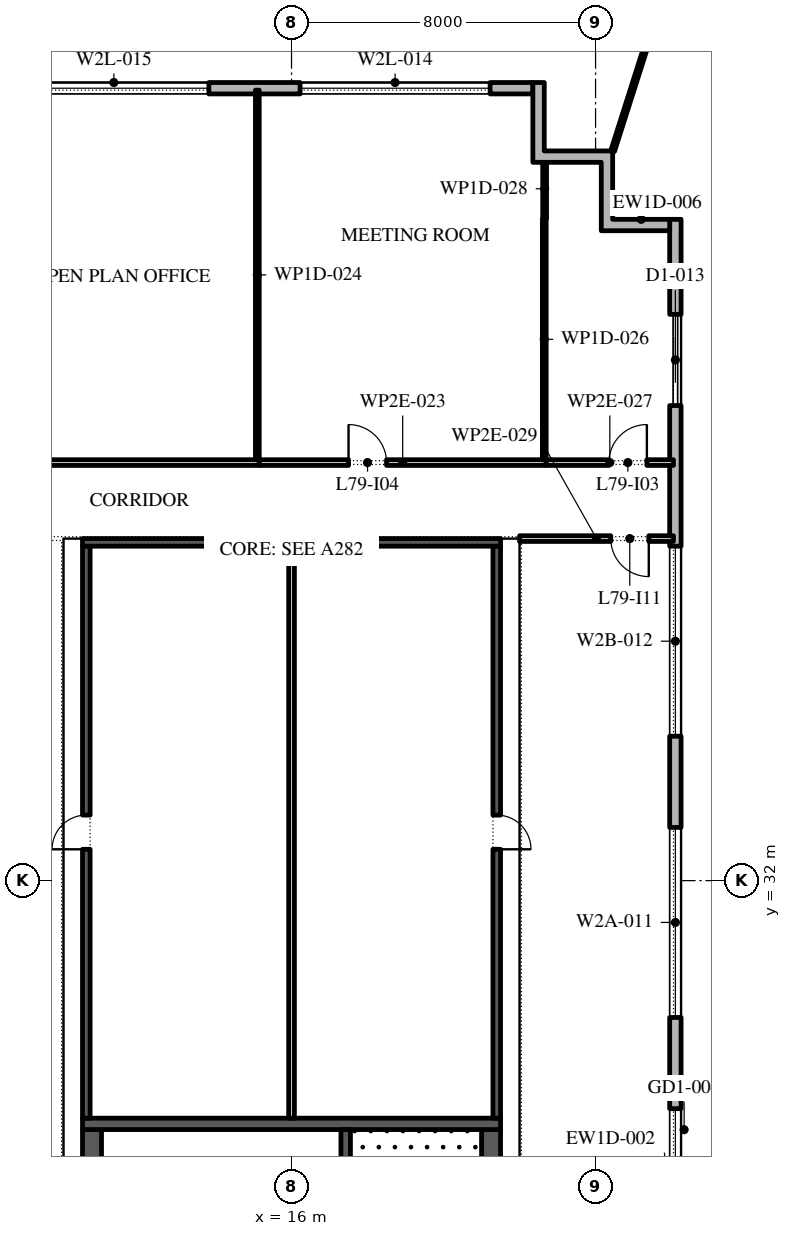
"""IFC4 building model, lengths in metres.
Left out: names, types, materials, properties, quantities, classifications, styles, units other than length and angle.
Written with IfcOpenShell. Run it as: python <this file> out.ifc"""

import sys

from ifc_helpers import new_model, si_unit, direction, frame, frame_2d, origin, place, context, subcontext, project, spatial, polyline, rectangle, outline, extrude, element, fill, save


model = new_model("IFC4")
c1 = context("Model", 3, precision=1e-05, world=origin(), true_north=direction((0.0, 1.0)))
c2 = subcontext(c1, "Body", "Model", "MODEL_VIEW")
j1 = project(units=[si_unit("LENGTHUNIT", "METRE"), si_unit("PLANEANGLEUNIT", "RADIAN")], contexts=[c1])
p1 = place(None, origin())
s1 = spatial("IfcSite", under=j1, at=p1, CompositionType="ELEMENT")
p2 = place(p1, origin())
s2 = spatial("IfcBuilding", under=s1, at=p2, CompositionType="ELEMENT")
p3 = place(p2, frame((0.0, 0.0, 359.4)))
s3 = spatial("IfcBuildingStorey", under=s2, at=p3, CompositionType="ELEMENT", Elevation=359.4)
p4 = place(p3, frame((26.1, -2.1, 0.0), z_axis=(0.0, 0.0, 1.0), x_axis=(0.0, 1.0, 0.0)))
e1 = element("IfcWall", 1, at=p4, inside=s3, PredefinedType="STANDARD", context=c2, shape_type="SweptSolid", body=[
    extrude(rectangle(XDim=51.5, YDim=0.3, at=frame_2d((25.75, 0.0))), origin(), (0.0, 0.0, 1.0), 3.9),
])
p5 = place(p4, frame((1.05, 0.0, 0.45)))
e2 = element("IfcOpeningElement", 2, at=p5, cuts=e1, PredefinedType="OPENING", context=c2, shape_type="SweptSolid", body=[
    extrude(rectangle(XDim=5.0, YDim=2.95, at=frame_2d((2.5, 1.475))), frame((0.0, 0.16, 0.0), z_axis=(0.0, -1.0, 0.0), x_axis=(1.0, 0.0, 0.0)), (0.0, 0.0, 1.0), 0.32),
])
p6 = place(p4, frame((8.3, 0.0, 0.45)))
e3 = element("IfcOpeningElement", 3, at=p6, cuts=e1, PredefinedType="OPENING", context=c2, shape_type="SweptSolid", body=[
    extrude(rectangle(XDim=5.0, YDim=2.95, at=frame_2d((2.5, 1.475))), frame((0.0, 0.16, 0.0), z_axis=(0.0, -1.0, 0.0), x_axis=(1.0, 0.0, 0.0)), (0.0, 0.0, 1.0), 0.32),
])
p7 = place(p4, frame((17.0, 0.0, 0.0)))
e4 = element("IfcOpeningElement", 4, at=p7, cuts=e1, PredefinedType="OPENING", context=c2, shape_type="SweptSolid", body=[
    extrude(rectangle(XDim=2.4, YDim=3.5, at=frame_2d((1.2, 1.75))), frame((0.0, 0.16, 0.0), z_axis=(0.0, -1.0, 0.0), x_axis=(1.0, 0.0, 0.0)), (0.0, 0.0, 1.0), 0.32),
])
p8 = place(p4, frame((23.1, 0.0, 0.45)))
e5 = element("IfcOpeningElement", 5, at=p8, cuts=e1, PredefinedType="OPENING", context=c2, shape_type="SweptSolid", body=[
    extrude(rectangle(XDim=5.0, YDim=2.95, at=frame_2d((2.5, 1.475))), frame((0.0, 0.16, 0.0), z_axis=(0.0, -1.0, 0.0), x_axis=(1.0, 0.0, 0.0)), (0.0, 0.0, 1.0), 0.32),
])
p9 = place(p4, frame((30.5, 0.0, 0.45)))
e6 = element("IfcOpeningElement", 6, at=p9, cuts=e1, PredefinedType="OPENING", context=c2, shape_type="SweptSolid", body=[
    extrude(rectangle(XDim=5.0, YDim=2.95, at=frame_2d((2.5, 1.475))), frame((0.0, 0.16, 0.0), z_axis=(0.0, -1.0, 0.0), x_axis=(1.0, 0.0, 0.0)), (0.0, 0.0, 1.0), 0.32),
])
p10 = place(p4, frame((37.9, 0.0, 0.45)))
e7 = element("IfcOpeningElement", 7, at=p10, cuts=e1, PredefinedType="OPENING", context=c2, shape_type="SweptSolid", body=[
    extrude(rectangle(XDim=5.0, YDim=2.9, at=frame_2d((2.5, 1.45))), frame((0.0, 0.16, 0.0), z_axis=(0.0, -1.0, 0.0), x_axis=(1.0, 0.0, 0.0)), (0.0, 0.0, 1.0), 0.32),
])
p11 = place(p4, frame((46.6, 0.0, 0.0)))
e8 = element("IfcOpeningElement", 8, at=p11, cuts=e1, PredefinedType="OPENING", context=c2, shape_type="SweptSolid", body=[
    extrude(rectangle(XDim=2.4, YDim=3.5, at=frame_2d((1.2, 1.75))), frame((0.0, 0.16, 0.0), z_axis=(0.0, -1.0, 0.0), x_axis=(1.0, 0.0, 0.0)), (0.0, 0.0, 1.0), 0.32),
])
p12 = place(p3, frame((22.35, 52.85, 0.0), z_axis=(0.0, 0.0, 1.0), x_axis=(-1.0, 0.0, 0.0)))
e9 = element("IfcWall", 9, at=p12, inside=s3, PredefinedType="STANDARD", context=c2, shape_type="SweptSolid", body=[
    extrude(rectangle(XDim=45.0, YDim=0.3, at=frame_2d((22.5, 0.0))), origin(), (0.0, 0.0, 1.0), 3.9),
])
p13 = place(p12, frame((1.125, 0.0, 0.45)))
e10 = element("IfcOpeningElement", 10, at=p13, cuts=e9, PredefinedType="OPENING", context=c2, shape_type="SweptSolid", body=[
    extrude(rectangle(XDim=5.0, YDim=2.4, at=frame_2d((2.5, 1.2))), frame((0.0, 0.16, 0.0), z_axis=(0.0, -1.0, 0.0), x_axis=(1.0, 0.0, 0.0)), (0.0, 0.0, 1.0), 0.32),
])
p14 = place(p12, frame((8.525, 0.0, 0.45)))
e11 = element("IfcOpeningElement", 11, at=p14, cuts=e9, PredefinedType="OPENING", context=c2, shape_type="SweptSolid", body=[
    extrude(rectangle(XDim=5.0, YDim=2.4, at=frame_2d((2.5, 1.2))), frame((0.0, 0.16, 0.0), z_axis=(0.0, -1.0, 0.0), x_axis=(1.0, 0.0, 0.0)), (0.0, 0.0, 1.0), 0.32),
])
p15 = place(p12, frame((17.375, 0.0, 0.0)))
e12 = element("IfcOpeningElement", 12, at=p15, cuts=e9, PredefinedType="OPENING", context=c2, shape_type="SweptSolid", body=[
    extrude(rectangle(XDim=2.4, YDim=3.5, at=frame_2d((1.2, 1.75))), frame((0.0, 0.16, 0.0), z_axis=(0.0, -1.0, 0.0), x_axis=(1.0, 0.0, 0.0)), (0.0, 0.0, 1.0), 0.32),
])
p16 = place(p12, frame((23.625, 0.0, 0.45)))
e13 = element("IfcOpeningElement", 13, at=p16, cuts=e9, PredefinedType="OPENING", context=c2, shape_type="SweptSolid", body=[
    extrude(rectangle(XDim=5.0, YDim=2.4, at=frame_2d((2.5, 1.2))), frame((0.0, 0.16, 0.0), z_axis=(0.0, -1.0, 0.0), x_axis=(1.0, 0.0, 0.0)), (0.0, 0.0, 1.0), 0.32),
])
p17 = place(p12, frame((31.175, 0.0, 0.45)))
e14 = element("IfcOpeningElement", 14, at=p17, cuts=e9, PredefinedType="OPENING", context=c2, shape_type="SweptSolid", body=[
    extrude(rectangle(XDim=5.0, YDim=2.4, at=frame_2d((2.5, 1.2))), frame((0.0, 0.16, 0.0), z_axis=(0.0, -1.0, 0.0), x_axis=(1.0, 0.0, 0.0)), (0.0, 0.0, 1.0), 0.32),
])
p18 = place(p12, frame((38.725, 0.0, 0.45)))
e15 = element("IfcOpeningElement", 15, at=p18, cuts=e9, PredefinedType="OPENING", context=c2, shape_type="SweptSolid", body=[
    extrude(rectangle(XDim=5.0, YDim=2.4, at=frame_2d((2.5, 1.2))), frame((0.0, 0.16, 0.0), z_axis=(0.0, -1.0, 0.0), x_axis=(1.0, 0.0, 0.0)), (0.0, 0.0, 1.0), 0.32),
])
p19 = place(p3, origin())
e16 = element("IfcWall", 16, at=p19, inside=s3, PredefinedType="STANDARD", context=c2, shape_type="SweptSolid", body=[
    extrude(outline(polyline([(24.15, 50.9), (22.35, 50.9), (22.35, 53.0), (22.65, 53.0), (22.65, 51.2), (24.45, 51.2), (24.45, 49.4), (25.95, 49.4), (25.95, 49.1), (24.15, 49.1), (24.15, 50.9)])), origin(), (0.0, 0.0, 1.0), 3.9),
])
p20 = place(p3, frame((24.45, 51.2, -0.05), z_axis=(0.0, 0.0, 1.0), x_axis=(0.303785175512, 0.952740556048, 0.0)))
e17 = element("IfcWall", 17, at=p20, inside=s3, PredefinedType="STANDARD", context=c2, shape_type="SweptSolid", body=[
    extrude(rectangle(XDim=7.174, YDim=0.1, at=frame_2d((3.587, 0.0))), origin(), (0.0, 0.0, 1.0), 3.95),
])
p21 = place(p3, frame((21.25, -2.45, 0.0), z_axis=(0.0, 0.0, 1.0), x_axis=(0.0, 1.0, 0.0)))
e18 = element("IfcWall", 18, at=p21, inside=s3, PredefinedType="SHEAR", context=c2, shape_type="SweptSolid", body=[
    extrude(rectangle(XDim=27.9, YDim=0.5, at=frame_2d((13.95, 0.0))), origin(), (0.0, 0.0, 1.0), 3.9),
])
p22 = place(p21, frame((5.05, 0.0, 0.0)))
e19 = element("IfcOpeningElement", 19, at=p22, cuts=e18, PredefinedType="OPENING", context=c2, shape_type="SweptSolid", body=[
    extrude(rectangle(XDim=1.2, YDim=2.1, at=frame_2d((0.6, 1.05))), frame((0.0, 0.26, 0.0), z_axis=(0.0, -1.0, 0.0), x_axis=(1.0, 0.0, 0.0)), (0.0, 0.0, 1.0), 0.52),
])
p23 = place(p21, frame((21.65, 0.0, 0.0)))
e20 = element("IfcOpeningElement", 20, at=p23, cuts=e18, PredefinedType="OPENING", context=c2, shape_type="SweptSolid", body=[
    extrude(rectangle(XDim=1.2, YDim=2.1, at=frame_2d((0.6, 1.05))), frame((0.0, 0.26, 0.0), z_axis=(0.0, -1.0, 0.0), x_axis=(1.0, 0.0, 0.0)), (0.0, 0.0, 1.0), 0.52),
])
p24 = place(p3, frame((10.75, -2.45, 0.0), z_axis=(0.0, 0.0, 1.0), x_axis=(0.0, 1.0, 0.0)))
e21 = element("IfcWall", 21, at=p24, inside=s3, PredefinedType="SHEAR", context=c2, shape_type="SweptSolid", body=[
    extrude(rectangle(XDim=27.9, YDim=0.5, at=frame_2d((13.95, 0.0))), origin(), (0.0, 0.0, 1.0), 3.9),
])
p25 = place(p24, frame((23.65, 0.0, 0.0)))
e22 = element("IfcOpeningElement", 22, at=p25, cuts=e21, PredefinedType="OPENING", context=c2, shape_type="SweptSolid", body=[
    extrude(rectangle(XDim=2.4, YDim=2.1, at=frame_2d((1.2, 1.05))), frame((0.0, 0.26, 0.0), z_axis=(0.0, -1.0, 0.0), x_axis=(1.0, 0.0, 0.0)), (0.0, 0.0, 1.0), 0.52),
])
p26 = place(p24, frame((1.387, 0.0, 0.0)))
e23 = element("IfcOpeningElement", 23, at=p26, cuts=e21, PredefinedType="OPENING", context=c2, shape_type="SweptSolid", body=[
    extrude(rectangle(XDim=0.9, YDim=2.1, at=frame_2d((0.45, 1.05))), frame((0.0, 0.26, 0.0), z_axis=(0.0, -1.0, 0.0), x_axis=(1.0, 0.0, 0.0)), (0.0, 0.0, 1.0), 0.52),
])
p27 = place(p24, frame((4.562, 0.0, 0.0)))
e24 = element("IfcOpeningElement", 24, at=p27, cuts=e21, PredefinedType="OPENING", context=c2, shape_type="SweptSolid", body=[
    extrude(rectangle(XDim=1.0, YDim=2.1, at=frame_2d((0.5, 1.05))), frame((0.0, 0.26, 0.0), z_axis=(0.0, -1.0, 0.0), x_axis=(1.0, 0.0, 0.0)), (0.0, 0.0, 1.0), 0.52),
])
p28 = place(p3, frame((10.5, 25.6, 0.0), z_axis=(0.0, 0.0, 1.0), x_axis=(1.0, 0.0, 0.0)))
e25 = element("IfcWall", 25, at=p28, inside=s3, PredefinedType="SHEAR", context=c2, shape_type="SweptSolid", body=[
    extrude(rectangle(XDim=11.0, YDim=0.3, at=frame_2d((5.5, 0.0))), origin(), (0.0, 0.0, 1.0), 3.9),
])
p29 = place(p3, frame((17.425, 19.15, 0.0), z_axis=(0.0, 0.0, 1.0), x_axis=(0.0, 1.0, 0.0)))
e26 = element("IfcWall", 26, at=p29, inside=s3, PredefinedType="SHEAR", context=c2, shape_type="SweptSolid", body=[
    extrude(rectangle(XDim=6.3, YDim=0.25, at=frame_2d((3.15, 0.0))), origin(), (0.0, 0.0, 1.0), 3.9),
])
p30 = place(p29, frame((0.05, 0.0, 0.0)))
e27 = element("IfcOpeningElement", 27, at=p30, cuts=e26, PredefinedType="OPENING", context=c2, shape_type="SweptSolid", body=[
    extrude(rectangle(XDim=1.2, YDim=2.1, at=frame_2d((0.6, 1.05))), frame((0.0, 0.135, 0.0), z_axis=(0.0, -1.0, 0.0), x_axis=(1.0, 0.0, 0.0)), (0.0, 0.0, 1.0), 0.27),
])
p31 = place(p3, frame((21.4, 25.75, 0.0), z_axis=(0.0, 0.0, 1.0), x_axis=(0.0, 1.0, 0.0)))
e28 = element("IfcWall", 28, at=p31, inside=s3, PredefinedType="SHEAR", context=c2, shape_type="SweptSolid", body=[
    extrude(rectangle(XDim=15.05, YDim=0.2, at=frame_2d((7.525, 0.0))), origin(), (0.0, 0.0, 1.0), 3.9),
])
p32 = place(p31, frame((7.075, 0.0, 0.0)))
e29 = element("IfcOpeningElement", 29, at=p32, cuts=e28, PredefinedType="OPENING", context=c2, shape_type="SweptSolid", body=[
    extrude(rectangle(XDim=0.9, YDim=2.1, at=frame_2d((0.45, 1.05))), frame((0.0, 0.11, 0.0), z_axis=(0.0, -1.0, 0.0), x_axis=(1.0, 0.0, 0.0)), (0.0, 0.0, 1.0), 0.22),
])
p33 = place(p3, frame((10.6, 25.75, 0.0), z_axis=(0.0, 0.0, 1.0), x_axis=(0.0, 1.0, 0.0)))
e30 = element("IfcWall", 30, at=p33, inside=s3, PredefinedType="SHEAR", context=c2, shape_type="SweptSolid", body=[
    extrude(rectangle(XDim=15.05, YDim=0.2, at=frame_2d((7.525, 0.0))), origin(), (0.0, 0.0, 1.0), 3.9),
])
p34 = place(p33, frame((7.075, 0.0, 0.0)))
e31 = element("IfcOpeningElement", 31, at=p34, cuts=e30, PredefinedType="OPENING", context=c2, shape_type="SweptSolid", body=[
    extrude(rectangle(XDim=0.9, YDim=2.1, at=frame_2d((0.45, 1.05))), frame((0.0, 0.11, 0.0), z_axis=(0.0, -1.0, 0.0), x_axis=(1.0, 0.0, 0.0)), (0.0, 0.0, 1.0), 0.22),
])
p35 = place(p3, frame((10.5, 40.9, 0.0), z_axis=(0.0, 0.0, 1.0), x_axis=(1.0, 0.0, 0.0)))
e32 = element("IfcWall", 32, at=p35, inside=s3, PredefinedType="SHEAR", context=c2, shape_type="SweptSolid", body=[
    extrude(rectangle(XDim=11.0, YDim=0.2, at=frame_2d((5.5, 0.0))), origin(), (0.0, 0.0, 1.0), 3.9),
])
p36 = place(p3, frame((16.0, 25.75, 0.0), z_axis=(0.0, 0.0, 1.0), x_axis=(0.0, 1.0, 0.0)))
e33 = element("IfcWall", 33, at=p36, inside=s3, PredefinedType="PARTITIONING", context=c2, shape_type="SweptSolid", body=[
    extrude(rectangle(XDim=15.05, YDim=0.15, at=frame_2d((7.525, 0.0))), origin(), (0.0, 0.0, 1.0), 3.9),
])
p37 = place(p3, frame((-0.05, 43.0, 0.0), z_axis=(0.0, 0.0, 1.0), x_axis=(1.0, 0.0, 0.0)))
e34 = element("IfcWall", 34, at=p37, inside=s3, PredefinedType="PARTITIONING", context=c2, shape_type="SweptSolid", body=[
    extrude(rectangle(XDim=15.2, YDim=0.15, at=frame_2d((7.6, 0.0))), origin(), (0.0, 0.0, 1.0), 3.9),
])
p38 = place(p37, frame((5.5, 0.0, 0.0)))
e35 = element("IfcOpeningElement", 35, at=p38, cuts=e34, PredefinedType="OPENING", context=c2, shape_type="SweptSolid", body=[
    extrude(rectangle(XDim=1.0, YDim=2.1, at=frame_2d((0.5, 1.05))), frame((0.0, 0.085, 0.0), z_axis=(0.0, -1.0, 0.0), x_axis=(1.0, 0.0, 0.0)), (0.0, 0.0, 1.0), 0.17),
])
p39 = place(p3, frame((15.15, 43.0, 0.0), z_axis=(0.0, 0.0, 1.0), x_axis=(1.0, 0.0, 0.0)))
e36 = element("IfcWall", 36, at=p39, inside=s3, PredefinedType="PARTITIONING", context=c2, shape_type="SweptSolid", body=[
    extrude(rectangle(XDim=7.55, YDim=0.15, at=frame_2d((3.775, 0.0))), origin(), (0.0, 0.0, 1.0), 3.9),
])
p40 = place(p39, frame((2.35, 0.0, 0.0)))
e37 = element("IfcOpeningElement", 37, at=p40, cuts=e36, PredefinedType="OPENING", context=c2, shape_type="SweptSolid", body=[
    extrude(rectangle(XDim=1.0, YDim=2.1, at=frame_2d((0.5, 1.05))), frame((0.0, 0.085, 0.0), z_axis=(0.0, -1.0, 0.0), x_axis=(1.0, 0.0, 0.0)), (0.0, 0.0, 1.0), 0.17),
])
p41 = place(p3, frame((15.1, 52.8, 0.0), z_axis=(0.0, 0.0, 1.0), x_axis=(0.0, -1.0, 0.0)))
e38 = element("IfcWall", 38, at=p41, inside=s3, PredefinedType="PARTITIONING", context=c2, shape_type="SweptSolid", body=[
    extrude(rectangle(XDim=9.725, YDim=0.1, at=frame_2d((4.863, 0.0))), origin(), (0.0, 0.0, 1.0), 3.9),
])
p42 = place(p3, frame((22.65, 43.075, 0.0), z_axis=(0.0, 0.0, 1.0), x_axis=(0.0, 1.0, 0.0)))
e39 = element("IfcWall", 39, at=p42, inside=s3, PredefinedType="PARTITIONING", context=c2, shape_type="SweptSolid", body=[
    extrude(rectangle(XDim=6.335, YDim=0.1, at=frame_2d((3.167, 0.0))), origin(), (0.0, 0.0, 1.0), 3.9),
])
p43 = place(p3, frame((22.7, 43.0, 0.0), z_axis=(0.0, 0.0, 1.0), x_axis=(1.0, 0.0, 0.0)))
e40 = element("IfcWall", 40, at=p43, inside=s3, PredefinedType="PARTITIONING", context=c2, shape_type="SweptSolid", body=[
    extrude(rectangle(XDim=3.35, YDim=0.15, at=frame_2d((1.675, 0.0))), origin(), (0.0, 0.0, 1.0), 3.9),
])
p44 = place(p43, frame((1.65, 0.0, 0.0)))
e41 = element("IfcOpeningElement", 41, at=p44, cuts=e40, PredefinedType="OPENING", context=c2, shape_type="SweptSolid", body=[
    extrude(rectangle(XDim=1.0, YDim=2.1, at=frame_2d((0.5, 1.05))), frame((0.0, 0.085, 0.0), z_axis=(0.0, -1.0, 0.0), x_axis=(1.0, 0.0, 0.0)), (0.0, 0.0, 1.0), 0.17),
])
p45 = place(p3, frame((22.66, 49.41, 0.0), z_axis=(0.0, 0.0, 1.0), x_axis=(0.0, 1.0, 0.0)))
e42 = element("IfcWall", 42, at=p45, inside=s3, PredefinedType="PARTITIONING", context=c2, shape_type="SweptSolid", body=[
    extrude(rectangle(XDim=1.59, YDim=0.1, at=frame_2d((0.795, 0.0))), origin(), (0.0, 0.0, 1.0), 3.9),
])
p46 = place(p3, frame((26.05, 41.0, 0.0), z_axis=(0.0, 0.0, 1.0), x_axis=(-1.0, 0.0, 0.0)))
e43 = element("IfcWall", 43, at=p46, inside=s3, PredefinedType="PARTITIONING", context=c2, shape_type="SweptSolid", body=[
    extrude(rectangle(XDim=4.05, YDim=0.15, at=frame_2d((2.025, 0.0))), origin(), (0.0, 0.0, 1.0), 3.9),
])
p47 = place(p46, frame((0.65, 0.0, 0.0)))
e44 = element("IfcOpeningElement", 44, at=p47, cuts=e43, PredefinedType="OPENING", context=c2, shape_type="SweptSolid", body=[
    extrude(rectangle(XDim=1.0, YDim=2.1, at=frame_2d((0.5, 1.05))), frame((0.0, 0.085, 0.0), z_axis=(0.0, -1.0, 0.0), x_axis=(1.0, 0.0, 0.0)), (0.0, 0.0, 1.0), 0.17),
])
p48 = place(p8, origin())
e45 = element("IfcWindow", 45, at=p48, inside=s3, PartitioningType="DOUBLE_PANEL_VERTICAL", PredefinedType="WINDOW", context=c2, shape_type="SweptSolid", body=[
    extrude(rectangle(XDim=5.0, YDim=2.95, at=frame_2d((2.5, 1.475))), frame((0.0, 0.03, 0.0), z_axis=(0.0, -1.0, 0.0), x_axis=(1.0, 0.0, 0.0)), (0.0, 0.0, 1.0), 0.06),
])
fill(e5, e45)
p49 = place(p9, origin())
e46 = element("IfcWindow", 46, at=p49, inside=s3, PartitioningType="DOUBLE_PANEL_VERTICAL", PredefinedType="WINDOW", context=c2, shape_type="SweptSolid", body=[
    extrude(rectangle(XDim=5.0, YDim=2.95, at=frame_2d((2.5, 1.475))), frame((0.0, 0.03, 0.0), z_axis=(0.0, -1.0, 0.0), x_axis=(1.0, 0.0, 0.0)), (0.0, 0.0, 1.0), 0.06),
])
fill(e6, e46)
p50 = place(p10, origin())
e47 = element("IfcWindow", 47, at=p50, inside=s3, PartitioningType="DOUBLE_PANEL_VERTICAL", PredefinedType="WINDOW", context=c2, shape_type="SweptSolid", body=[
    extrude(rectangle(XDim=5.0, YDim=2.9, at=frame_2d((2.5, 1.45))), frame((0.0, 0.03, 0.0), z_axis=(0.0, -1.0, 0.0), x_axis=(1.0, 0.0, 0.0)), (0.0, 0.0, 1.0), 0.06),
])
fill(e7, e47)
p51 = place(p11, origin())
e48 = element("IfcDoor", 48, at=p51, inside=s3, OperationType="DOUBLE_DOOR_SLIDING", PredefinedType="DOOR", context=c2, shape_type="SweptSolid", body=[
    extrude(rectangle(XDim=2.4, YDim=3.5, at=frame_2d((1.2, 1.75))), frame((0.0, 0.025, 0.0), z_axis=(0.0, -1.0, 0.0), x_axis=(1.0, 0.0, 0.0)), (0.0, 0.0, 1.0), 0.05),
])
fill(e8, e48)
p52 = place(p13, origin())
e49 = element("IfcWindow", 49, at=p52, inside=s3, PartitioningType="DOUBLE_PANEL_VERTICAL", PredefinedType="WINDOW", context=c2, shape_type="SweptSolid", body=[
    extrude(rectangle(XDim=5.0, YDim=2.4, at=frame_2d((2.5, 1.2))), frame((0.0, 0.03, 0.0), z_axis=(0.0, -1.0, 0.0), x_axis=(1.0, 0.0, 0.0)), (0.0, 0.0, 1.0), 0.06),
])
fill(e10, e49)
p53 = place(p14, origin())
e50 = element("IfcWindow", 50, at=p53, inside=s3, PartitioningType="DOUBLE_PANEL_VERTICAL", PredefinedType="WINDOW", context=c2, shape_type="SweptSolid", body=[
    extrude(rectangle(XDim=5.0, YDim=2.4, at=frame_2d((2.5, 1.2))), frame((0.0, 0.03, 0.0), z_axis=(0.0, -1.0, 0.0), x_axis=(1.0, 0.0, 0.0)), (0.0, 0.0, 1.0), 0.06),
])
fill(e11, e50)
p54 = place(p32, frame((0.9, 0.15, 0.0), z_axis=(0.0, 0.0, 1.0), x_axis=(-1.0, 0.0, 0.0)))
e51 = element("IfcDoor", 51, at=p54, inside=s3, OperationType="SINGLE_SWING_LEFT", PredefinedType="DOOR", context=c2, shape_type="SweptSolid", body=[
    extrude(rectangle(XDim=0.9, YDim=2.1, at=frame_2d((0.45, 1.05))), frame((0.0, 0.1, 0.0), z_axis=(0.0, -1.0, 0.0), x_axis=(1.0, 0.0, 0.0)), (0.0, 0.0, 1.0), 0.05),
])
fill(e29, e51)
p55 = place(p34, origin())
e52 = element("IfcDoor", 52, at=p55, inside=s3, OperationType="SINGLE_SWING_RIGHT", PredefinedType="DOOR", context=c2, shape_type="SweptSolid", body=[
    extrude(rectangle(XDim=0.9, YDim=2.1, at=frame_2d((0.45, 1.05))), frame((0.0, -0.05, 0.0), z_axis=(0.0, -1.0, 0.0), x_axis=(1.0, 0.0, 0.0)), (0.0, 0.0, 1.0), 0.05),
])
fill(e31, e52)
p56 = place(p44, origin())
e53 = element("IfcDoor", 53, at=p56, inside=s3, OperationType="SINGLE_SWING_LEFT", PredefinedType="DOOR", context=c2, shape_type="SweptSolid", body=[
    extrude(rectangle(XDim=1.0, YDim=2.1, at=frame_2d((0.5, 1.05))), frame((0.0, 0.025, 0.0), z_axis=(0.0, -1.0, 0.0), x_axis=(1.0, 0.0, 0.0)), (0.0, 0.0, 1.0), 0.05),
])
fill(e41, e53)
p57 = place(p40, origin())
e54 = element("IfcDoor", 54, at=p57, inside=s3, OperationType="SINGLE_SWING_RIGHT", PredefinedType="DOOR", context=c2, shape_type="SweptSolid", body=[
    extrude(rectangle(XDim=1.0, YDim=2.1, at=frame_2d((0.5, 1.05))), frame((0.0, 0.025, 0.0), z_axis=(0.0, -1.0, 0.0), x_axis=(1.0, 0.0, 0.0)), (0.0, 0.0, 1.0), 0.05),
])
fill(e37, e54)
p58 = place(p47, origin())
e55 = element("IfcDoor", 55, at=p58, inside=s3, OperationType="SINGLE_SWING_RIGHT", PredefinedType="DOOR", context=c2, shape_type="SweptSolid", body=[
    extrude(rectangle(XDim=1.0, YDim=2.1, at=frame_2d((0.5, 1.05))), frame((0.0, 0.025, 0.0), z_axis=(0.0, -1.0, 0.0), x_axis=(1.0, 0.0, 0.0)), (0.0, 0.0, 1.0), 0.05),
])
fill(e44, e55)
save(model, sys.argv[1])
